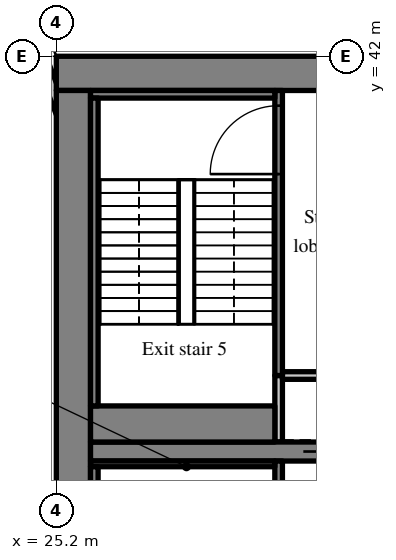
"""IFC4 building model, lengths in metres.
Left out: names, types, materials, properties, quantities, classifications, styles, units other than length and angle.
Written with IfcOpenShell. Run it as: python <this file> out.ifc"""

import sys

from ifc_helpers import new_model, si_unit, direction, frame, frame_2d, origin, place, context, subcontext, project, spatial, rectangle, extrude, source, transform, mapped, element, fill, save


model = new_model("IFC4")
c1 = context("Model", 3, precision=1e-05, world=origin(), true_north=direction((0.0, 1.0)))
c2 = subcontext(c1, "Body", "Model", "MODEL_VIEW")
j1 = project(units=[si_unit("LENGTHUNIT", "METRE"), si_unit("PLANEANGLEUNIT", "RADIAN")], contexts=[c1])
p1 = place(None, origin())
s1 = spatial("IfcSite", under=j1, at=p1, CompositionType="ELEMENT")
p2 = place(p1, origin())
s2 = spatial("IfcBuilding", under=s1, at=p2, CompositionType="ELEMENT")
p3 = place(p2, frame((0.0, 0.0, 118.0)))
s3 = spatial("IfcBuildingStorey", under=s2, at=p3, CompositionType="ELEMENT", Elevation=118.0)
m1 = source(origin(), c2, "Body", "SweptSolid", [
    extrude(rectangle(XDim=50.4, YDim=0.9, at=frame_2d((25.2, 0.0))), origin(), (0.0, 0.0, 1.0), 3.52),
])
p4 = place(p3, frame((25.2, 41.55, 0.0), z_axis=(0.0, 0.0, 1.0), x_axis=(1.0, 0.0, 0.0)))
e1 = element("IfcWall", 1, at=p4, inside=s3, PredefinedType="SHEAR", context=c2, shape_type="MappedRepresentation", body=[
    mapped(m1, transform((0.0, 0.0, 0.0), scale=1.0)),
])
m2 = source(origin(), c2, "Body", "SweptSolid", [
    extrude(rectangle(XDim=18.2, YDim=0.9, at=frame_2d((9.1, 0.0))), origin(), (0.0, 0.0, 1.0), 3.52),
])
p5 = place(p3, frame((25.65, 22.9, 0.0), z_axis=(0.0, 0.0, 1.0), x_axis=(0.0, 1.0, 0.0)))
e2 = element("IfcWall", 2, at=p5, inside=s3, PredefinedType="SHEAR", context=c2, shape_type="MappedRepresentation", body=[
    mapped(m2, transform((0.0, 0.0, 0.0), scale=1.0)),
])
m3 = source(origin(), c2, "Body", "SweptSolid", [
    extrude(rectangle(XDim=7.25, YDim=0.5, at=frame_2d((3.625, 0.0))), origin(), (0.0, 0.0, 1.0), 3.52),
])
p6 = place(p3, frame((26.1, 31.6, 0.0), z_axis=(0.0, 0.0, 1.0), x_axis=(1.0, 0.0, 0.0)))
e3 = element("IfcWall", 3, at=p6, inside=s3, PredefinedType="SHEAR", context=c2, shape_type="MappedRepresentation", body=[
    mapped(m3, transform((0.0, 0.0, 0.0), scale=1.0)),
])
m4 = source(origin(), c2, "Body", "SweptSolid", [
    extrude(rectangle(XDim=1.1, YDim=2.1, at=frame_2d((0.55, 1.05))), frame((0.0, 0.26, 0.0), z_axis=(0.0, -1.0, 0.0), x_axis=(1.0, 0.0, 0.0)), (0.0, 0.0, 1.0), 0.52),
])
p7 = place(p6, frame((5.6, 0.0, 0.0)))
e4 = element("IfcOpeningElement", 4, at=p7, cuts=e3, PredefinedType="OPENING", context=c2, shape_type="MappedRepresentation", body=[
    mapped(m4, transform((0.0, 0.0, 0.0), scale=1.0)),
])
m5 = source(origin(), c2, "Body", "SweptSolid", [
    extrude(rectangle(XDim=3.559, YDim=0.3, at=frame_2d((1.78, 0.0))), origin(), (0.0, 0.0, 1.0), 3.52),
])
p8 = place(p3, frame((25.55, 39.969, 0.0), z_axis=(0.0, 0.0, 1.0), x_axis=(-0.35779745313, 0.933799219604, 0.0)))
e5 = element("IfcWall", 5, at=p8, inside=s3, PredefinedType="SOLIDWALL", context=c2, shape_type="MappedRepresentation", body=[
    mapped(m5, transform((0.0, 0.0, 0.0), scale=1.0)),
])
m6 = source(origin(), c2, "Body", "SweptSolid", [
    extrude(rectangle(XDim=1.5, YDim=2.0, at=frame_2d((0.75, 1.0))), frame((0.0, 0.16, 0.0), z_axis=(0.0, -1.0, 0.0), x_axis=(1.0, 0.0, 0.0)), (0.0, 0.0, 1.0), 0.32),
])
p9 = place(p8, frame((1.903, 0.0, 0.9)))
e6 = element("IfcOpeningElement", 6, at=p9, cuts=e5, PredefinedType="OPENING", context=c2, shape_type="MappedRepresentation", body=[
    mapped(m6, transform((0.0, 0.0, 0.0), scale=1.0)),
])
m7 = source(origin(), c2, "Body", "SweptSolid", [
    extrude(rectangle(XDim=8.45, YDim=0.2, at=frame_2d((4.225, 0.0))), origin(), (0.0, 0.0, 1.0), 3.52),
])
p10 = place(p3, frame((31.05, 22.9, 0.0), z_axis=(0.0, 0.0, 1.0), x_axis=(0.0, 1.0, 0.0)))
e7 = element("IfcWall", 7, at=p10, inside=s3, PredefinedType="SOLIDWALL", context=c2, shape_type="MappedRepresentation", body=[
    mapped(m7, transform((0.0, 0.0, 0.0), scale=1.0)),
])
m8 = source(origin(), c2, "Body", "SweptSolid", [
    extrude(rectangle(XDim=1.2, YDim=2.1, at=frame_2d((0.6, 1.05))), frame((0.0, 0.11, 0.0), z_axis=(0.0, -1.0, 0.0), x_axis=(1.0, 0.0, 0.0)), (0.0, 0.0, 1.0), 0.22),
])
p11 = place(p10, frame((6.6, 0.0, 0.0)))
e8 = element("IfcOpeningElement", 8, at=p11, cuts=e7, PredefinedType="OPENING", context=c2, shape_type="MappedRepresentation", body=[
    mapped(m8, transform((0.0, 0.0, 0.0), scale=1.0)),
])
m9 = source(origin(), c2, "Body", "SweptSolid", [
    extrude(rectangle(XDim=1.75, YDim=0.2, at=frame_2d((0.875, 0.0))), origin(), (0.0, 0.0, 1.0), 3.52),
])
p12 = place(p3, frame((31.05, 31.85, 0.0), z_axis=(0.0, 0.0, 1.0), x_axis=(0.0, 1.0, 0.0)))
e9 = element("IfcWall", 9, at=p12, inside=s3, PredefinedType="SOLIDWALL", context=c2, shape_type="MappedRepresentation", body=[
    mapped(m9, transform((0.0, 0.0, 0.0), scale=1.0)),
])
m10 = source(origin(), c2, "Body", "SweptSolid", [
    extrude(rectangle(XDim=2.2, YDim=0.2, at=frame_2d((1.1, 0.0))), origin(), (0.0, 0.0, 1.0), 3.52),
])
p13 = place(p3, frame((31.15, 33.6, 0.0), z_axis=(0.0, 0.0, 1.0), x_axis=(1.0, 0.0, 0.0)))
e10 = element("IfcWall", 10, at=p13, inside=s3, PredefinedType="SOLIDWALL", context=c2, shape_type="MappedRepresentation", body=[
    mapped(m10, transform((0.0, 0.0, 0.0), scale=1.0)),
])
m11 = source(origin(), c2, "Body", "SweptSolid", [
    extrude(rectangle(XDim=7.5, YDim=0.2, at=frame_2d((3.75, 0.0))), origin(), (0.0, 0.0, 1.0), 3.52),
])
p14 = place(p3, frame((31.05, 33.6, 0.0), z_axis=(0.0, 0.0, 1.0), x_axis=(0.0, 1.0, 0.0)))
e11 = element("IfcWall", 11, at=p14, inside=s3, PredefinedType="SOLIDWALL", context=c2, shape_type="MappedRepresentation", body=[
    mapped(m11, transform((0.0, 0.0, 0.0), scale=1.0)),
])
m12 = source(origin(), c2, "Body", "SweptSolid", [
    extrude(rectangle(XDim=1.8, YDim=2.1, at=frame_2d((0.9, 1.05))), frame((0.0, 0.11, 0.0), z_axis=(0.0, -1.0, 0.0), x_axis=(1.0, 0.0, 0.0)), (0.0, 0.0, 1.0), 0.22),
])
p15 = place(p14, frame((5.3, 0.0, 0.0)))
e12 = element("IfcOpeningElement", 12, at=p15, cuts=e11, PredefinedType="OPENING", context=c2, shape_type="MappedRepresentation", body=[
    mapped(m12, transform((0.0, 0.0, 0.0), scale=1.0)),
])
m13 = source(origin(), c2, "Body", "SweptSolid", [
    extrude(rectangle(XDim=4.85, YDim=0.15, at=frame_2d((2.425, 0.0))), origin(), (0.0, 0.0, 1.0), 3.52),
])
p16 = place(p3, frame((26.1, 31.275, 0.0), z_axis=(0.0, 0.0, 1.0), x_axis=(1.0, 0.0, 0.0)))
e13 = element("IfcWall", 13, at=p16, inside=s3, PredefinedType="SOLIDWALL", context=c2, shape_type="MappedRepresentation", body=[
    mapped(m13, transform((0.0, 0.0, 0.0), scale=1.0)),
])
m14 = source(origin(), c2, "Body", "SweptSolid", [
    extrude(rectangle(XDim=8.1, YDim=0.2, at=frame_2d((4.05, 0.0))), origin(), (0.0, 0.0, 1.0), 3.52),
])
p17 = place(p3, frame((26.2, 23.1, 0.0), z_axis=(0.0, 0.0, 1.0), x_axis=(0.0, 1.0, 0.0)))
e14 = element("IfcWall", 14, at=p17, inside=s3, PredefinedType="SOLIDWALL", context=c2, shape_type="MappedRepresentation", body=[
    mapped(m14, transform((0.0, 0.0, 0.0), scale=1.0)),
])
m15 = source(origin(), c2, "Body", "SweptSolid", [
    extrude(rectangle(XDim=4.85, YDim=0.2, at=frame_2d((2.425, 0.0))), origin(), (0.0, 0.0, 1.0), 3.52),
])
p18 = place(p3, frame((26.1, 41.0, 0.0), z_axis=(0.0, 0.0, 1.0), x_axis=(1.0, 0.0, 0.0)))
e15 = element("IfcWall", 15, at=p18, inside=s3, PredefinedType="SOLIDWALL", context=c2, shape_type="MappedRepresentation", body=[
    mapped(m15, transform((0.0, 0.0, 0.0), scale=1.0)),
])
m16 = source(origin(), c2, "Body", "SweptSolid", [
    extrude(rectangle(XDim=4.85, YDim=0.95, at=frame_2d((2.425, 0.0))), origin(), (0.0, 0.0, 1.0), 3.52),
])
p19 = place(p3, frame((26.1, 32.325, 0.0), z_axis=(0.0, 0.0, 1.0), x_axis=(1.0, 0.0, 0.0)))
e16 = element("IfcWall", 16, at=p19, inside=s3, PredefinedType="SOLIDWALL", context=c2, shape_type="MappedRepresentation", body=[
    mapped(m16, transform((0.0, 0.0, 0.0), scale=1.0)),
])
p20 = place(p3, frame((26.2, 32.8, 0.0), z_axis=(0.0, 0.0, 1.0), x_axis=(0.0, 1.0, 0.0)))
e17 = element("IfcWall", 17, at=p20, inside=s3, PredefinedType="SOLIDWALL", context=c2, shape_type="MappedRepresentation", body=[
    mapped(m14, transform((0.0, 0.0, 0.0), scale=1.0)),
])
m17 = source(origin(), c2, "Body", "SweptSolid", [
    extrude(rectangle(XDim=1.1, YDim=2.1, at=frame_2d((0.55, 1.05))), frame((0.0, 0.025, 0.0), z_axis=(0.0, -1.0, 0.0), x_axis=(1.0, 0.0, 0.0)), (0.0, 0.0, 1.0), 0.05),
])
p21 = place(p7, origin())
e18 = element("IfcDoor", 18, at=p21, inside=s3, OperationType="SLIDING_TO_RIGHT", PredefinedType="DOOR", context=c2, shape_type="MappedRepresentation", body=[
    mapped(m17, transform((0.0, 0.0, 0.0), scale=1.0)),
])
fill(e4, e18)
m18 = source(origin(), c2, "Body", "SweptSolid", [
    extrude(rectangle(XDim=1.8, YDim=2.1, at=frame_2d((0.9, 1.05))), frame((0.0, 0.025, 0.0), z_axis=(0.0, -1.0, 0.0), x_axis=(1.0, 0.0, 0.0)), (0.0, 0.0, 1.0), 0.05),
])
p22 = place(p15, origin())
e19 = element("IfcDoor", 19, at=p22, inside=s3, OperationType="SINGLE_SWING_LEFT", PredefinedType="DOOR", context=c2, shape_type="MappedRepresentation", body=[
    mapped(m18, transform((0.0, 0.0, 0.0), scale=1.0)),
])
fill(e12, e19)
save(model, sys.argv[1])
